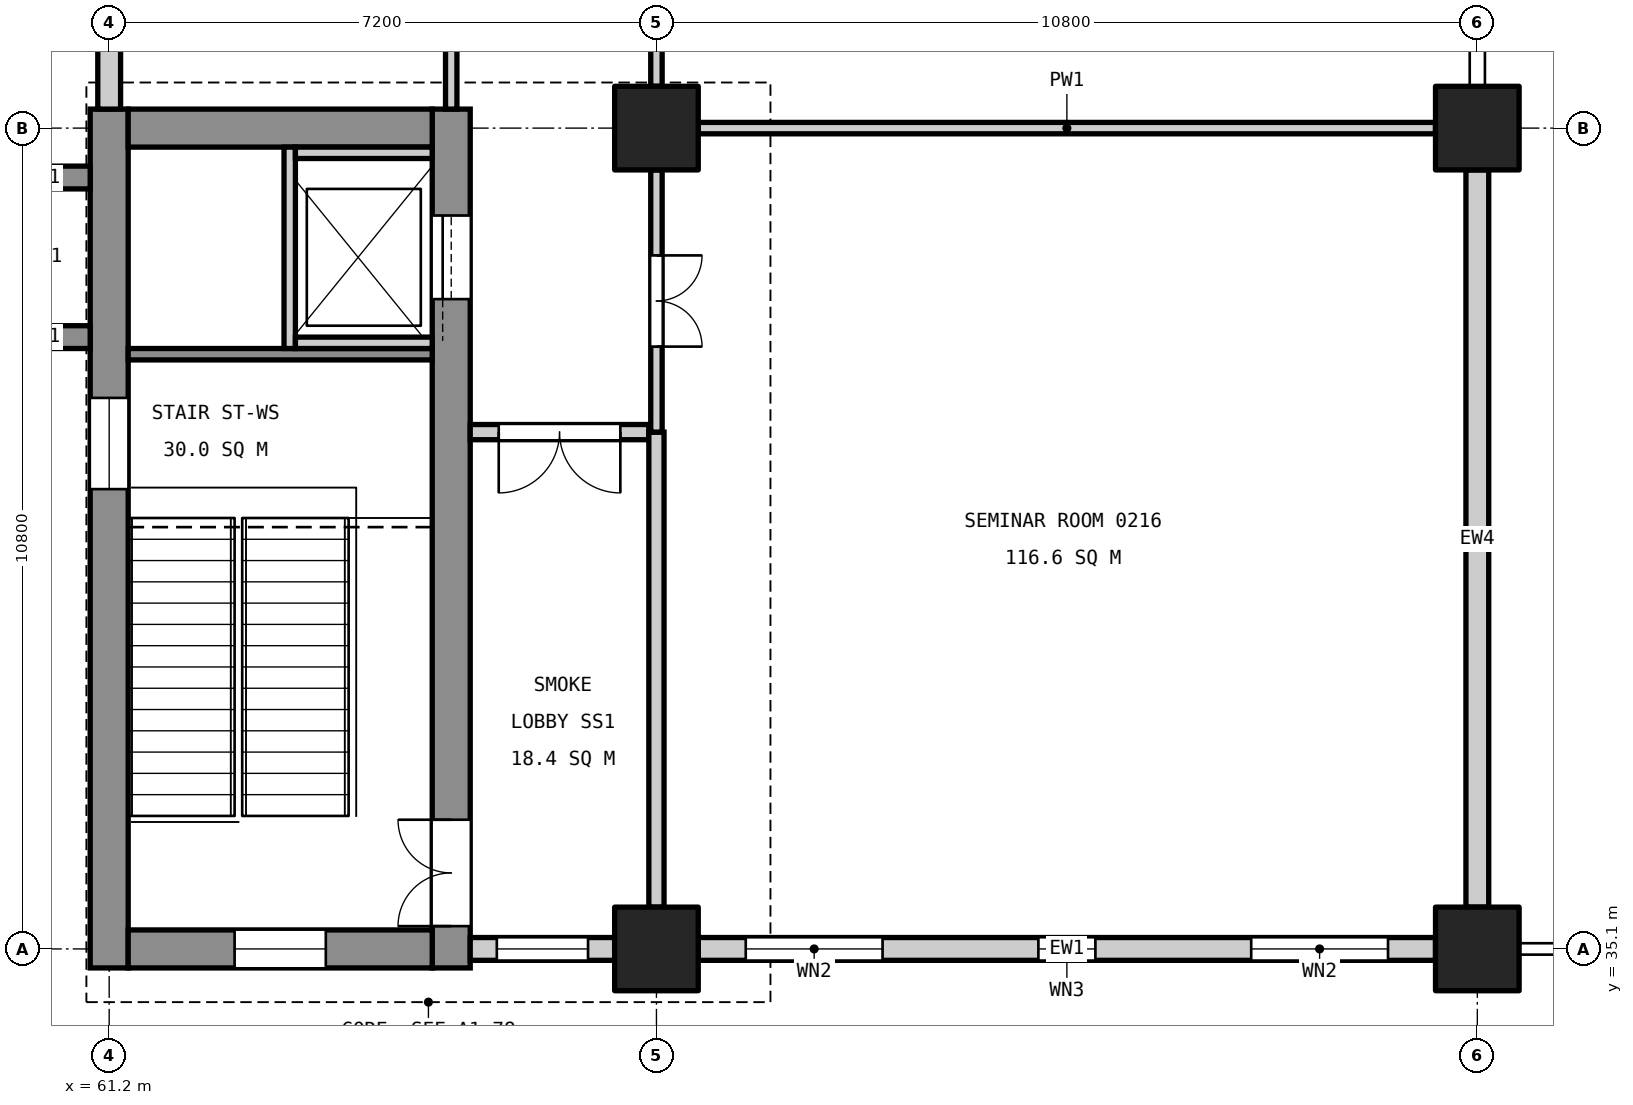
"""IFC4 building model, lengths in metres.
Left out: names, types, materials, properties, quantities, classifications, styles, units other than length and angle.
Written with IfcOpenShell. Run it as: python <this file> out.ifc"""

import sys

from ifc_helpers import new_model, si_unit, direction, frame, frame_2d, origin, origin_2d, place, context, subcontext, project, spatial, rectangle, extrude, element, fill, save


model = new_model("IFC4")
c1 = context("Model", 3, precision=1e-05, world=origin(), true_north=direction((0.0, 1.0)))
c2 = subcontext(c1, "Body", "Model", "MODEL_VIEW")
j1 = project(units=[si_unit("LENGTHUNIT", "METRE"), si_unit("PLANEANGLEUNIT", "RADIAN")], contexts=[c1])
p1 = place(None, origin())
s1 = spatial("IfcSite", under=j1, at=p1, CompositionType="ELEMENT")
p2 = place(p1, origin())
s2 = spatial("IfcBuilding", under=s1, at=p2, CompositionType="ELEMENT")
p3 = place(p2, frame((0.0, 0.0, 11.4)))
s3 = spatial("IfcBuildingStorey", under=s2, at=p3, CompositionType="ELEMENT", Elevation=11.4)
for number, where, z_axis, x_axis in (
    (1, (68.4, 35.1, 0.0), (0.0, 0.0, 1.0), (1.0, 0.0, 0.0)),
    (2, (68.4, 45.9, 0.0), (0.0, 0.0, 1.0), (1.0, 0.0, 0.0)),
    (3, (79.2, 35.1, 0.0), (0.0, 0.0, 1.0), (1.0, 0.0, 0.0)),
    (4, (79.2, 45.9, 0.0), (0.0, 0.0, 1.0), (1.0, 0.0, 0.0)),
):
    element("IfcColumn", number, at=place(p3, frame(where, z_axis=z_axis, x_axis=x_axis)), inside=s3, PredefinedType="COLUMN", context=c2, shape_type="SweptSolid", body=[
        extrude(rectangle(XDim=1.1, YDim=1.1, at=origin_2d()), origin(), (0.0, 0.0, 1.0), 5.4),
    ])
p4 = place(p3, frame((61.2, 34.85, 0.0), z_axis=(0.0, 0.0, 1.0), x_axis=(0.0, 1.0, 0.0)))
e5 = element("IfcWall", 5, at=p4, inside=s3, PredefinedType="SHEAR", context=c2, shape_type="SweptSolid", body=[
    extrude(rectangle(XDim=11.3, YDim=0.5, at=frame_2d((5.65, 0.0))), origin(), (0.0, 0.0, 1.0), 5.1),
])
p5 = place(p4, frame((6.3, 0.0, 3.4)))
e6 = element("IfcOpeningElement", 6, at=p5, cuts=e5, PredefinedType="OPENING", context=c2, shape_type="SweptSolid", body=[
    extrude(rectangle(XDim=1.2, YDim=0.9, at=frame_2d((0.6, 0.45))), frame((0.0, 0.26, 0.0), z_axis=(0.0, -1.0, 0.0), x_axis=(1.0, 0.0, 0.0)), (0.0, 0.0, 1.0), 0.52),
])
p6 = place(p3, frame((65.7, 34.85, 0.0), z_axis=(0.0, 0.0, 1.0), x_axis=(0.0, 1.0, 0.0)))
e7 = element("IfcWall", 7, at=p6, inside=s3, PredefinedType="SHEAR", context=c2, shape_type="SweptSolid", body=[
    extrude(rectangle(XDim=11.3, YDim=0.5, at=frame_2d((5.65, 0.0))), origin(), (0.0, 0.0, 1.0), 5.1),
])
p7 = place(p6, frame((0.55, 0.0, 0.0)))
e8 = element("IfcOpeningElement", 8, at=p7, cuts=e7, PredefinedType="OPENING", context=c2, shape_type="SweptSolid", body=[
    extrude(rectangle(XDim=1.4, YDim=2.1, at=frame_2d((0.7, 1.05))), frame((0.0, 0.26, 0.0), z_axis=(0.0, -1.0, 0.0), x_axis=(1.0, 0.0, 0.0)), (0.0, 0.0, 1.0), 0.52),
])
p8 = place(p6, frame((8.8, 0.0, 0.0)))
e9 = element("IfcOpeningElement", 9, at=p8, cuts=e7, PredefinedType="OPENING", context=c2, shape_type="SweptSolid", body=[
    extrude(rectangle(XDim=1.1, YDim=2.1, at=frame_2d((0.55, 1.05))), frame((0.0, 0.26, 0.0), z_axis=(0.0, -1.0, 0.0), x_axis=(1.0, 0.0, 0.0)), (0.0, 0.0, 1.0), 0.52),
])
p9 = place(p3, frame((61.45, 35.1, 0.0), z_axis=(0.0, 0.0, 1.0), x_axis=(1.0, 0.0, 0.0)))
e10 = element("IfcWall", 10, at=p9, inside=s3, PredefinedType="SHEAR", context=c2, shape_type="SweptSolid", body=[
    extrude(rectangle(XDim=4.0, YDim=0.5, at=frame_2d((2.0, 0.0))), origin(), (0.0, 0.0, 1.0), 5.1),
])
p10 = place(p9, frame((1.4, 0.0, 3.4)))
e11 = element("IfcOpeningElement", 11, at=p10, cuts=e10, PredefinedType="OPENING", context=c2, shape_type="SweptSolid", body=[
    extrude(rectangle(XDim=1.2, YDim=0.9, at=frame_2d((0.6, 0.45))), frame((0.0, 0.26, 0.0), z_axis=(0.0, -1.0, 0.0), x_axis=(1.0, 0.0, 0.0)), (0.0, 0.0, 1.0), 0.52),
])
p11 = place(p3, frame((61.45, 45.9, 0.0), z_axis=(0.0, 0.0, 1.0), x_axis=(1.0, 0.0, 0.0)))
e12 = element("IfcWall", 12, at=p11, inside=s3, PredefinedType="SHEAR", context=c2, shape_type="SweptSolid", body=[
    extrude(rectangle(XDim=4.0, YDim=0.5, at=frame_2d((2.0, 0.0))), origin(), (0.0, 0.0, 1.0), 5.1),
])
for number, where, z_axis, x_axis in (
    (13, (60.95, 43.15, 0.0), (0.0, 0.0, 1.0), (-1.0, 0.0, 0.0)),
    (14, (60.95, 45.25, 0.0), (0.0, 0.0, 1.0), (-1.0, 0.0, 0.0)),
):
    element("IfcWall", number, at=place(p3, frame(where, z_axis=z_axis, x_axis=x_axis)), inside=s3, PredefinedType="SHEAR", context=c2, shape_type="SweptSolid", body=[
        extrude(rectangle(XDim=1.25, YDim=0.3, at=frame_2d((0.625, 0.0))), origin(), (0.0, 0.0, 1.0), 5.4),
    ])
p12 = place(p3, frame((61.45, 42.925, 0.0), z_axis=(0.0, 0.0, 1.0), x_axis=(1.0, 0.0, 0.0)))
e15 = element("IfcWall", 15, at=p12, inside=s3, PredefinedType="SOLIDWALL", context=c2, shape_type="SweptSolid", body=[
    extrude(rectangle(XDim=4.0, YDim=0.15, at=frame_2d((2.0, 0.0))), origin(), (0.0, 0.0, 1.0), 5.1),
])
p13 = place(p3, frame((63.575, 43.0, 0.0), z_axis=(0.0, 0.0, 1.0), x_axis=(0.0, 1.0, 0.0)))
e16 = element("IfcWall", 16, at=p13, inside=s3, PredefinedType="SOLIDWALL", context=c2, shape_type="SweptSolid", body=[
    extrude(rectangle(XDim=2.65, YDim=0.15, at=frame_2d((1.325, 0.0))), origin(), (0.0, 0.0, 1.0), 5.4),
])
for number, where, z_axis, x_axis in (
    (17, (63.65, 43.075, 0.0), (0.0, 0.0, 1.0), (1.0, 0.0, 0.0)),
    (18, (63.65, 45.575, 0.0), (0.0, 0.0, 1.0), (1.0, 0.0, 0.0)),
):
    element("IfcWall", number, at=place(p3, frame(where, z_axis=z_axis, x_axis=x_axis)), inside=s3, PredefinedType="SOLIDWALL", context=c2, shape_type="SweptSolid", body=[
        extrude(rectangle(XDim=1.8, YDim=0.15, at=frame_2d((0.9, 0.0))), origin(), (0.0, 0.0, 1.0), 5.4),
    ])
p14 = place(p3, frame((61.2, 46.15, 0.0), z_axis=(0.0, 0.0, 1.0), x_axis=(0.0, 1.0, 0.0)))
e19 = element("IfcWall", 19, at=p14, inside=s3, PredefinedType="STANDARD", context=c2, shape_type="SweptSolid", body=[
    extrude(rectangle(XDim=10.0, YDim=0.3, at=frame_2d((5.0, 0.0))), origin(), (0.0, 0.0, 1.0), 4.1),
])
p15 = place(p14, frame((1.3, 0.0, 0.8)))
e20 = element("IfcOpeningElement", 20, at=p15, cuts=e19, PredefinedType="OPENING", context=c2, shape_type="SweptSolid", body=[
    extrude(rectangle(XDim=0.75, YDim=1.2, at=frame_2d((0.375, 0.6))), frame((0.0, 0.16, 0.0), z_axis=(0.0, -1.0, 0.0), x_axis=(1.0, 0.0, 0.0)), (0.0, 0.0, 1.0), 0.32),
])
p16 = place(p14, frame((4.25, 0.0, 0.9)))
e21 = element("IfcOpeningElement", 21, at=p16, cuts=e19, PredefinedType="OPENING", context=c2, shape_type="SweptSolid", body=[
    extrude(rectangle(XDim=1.8, YDim=3.0, at=frame_2d((0.9, 1.5))), frame((0.0, 0.16, 0.0), z_axis=(0.0, -1.0, 0.0), x_axis=(1.0, 0.0, 0.0)), (0.0, 0.0, 1.0), 0.32),
])
p17 = place(p14, frame((7.575, 0.0, 0.9)))
e22 = element("IfcOpeningElement", 22, at=p17, cuts=e19, PredefinedType="OPENING", context=c2, shape_type="SweptSolid", body=[
    extrude(rectangle(XDim=1.8, YDim=3.0, at=frame_2d((0.9, 1.5))), frame((0.0, 0.16, 0.0), z_axis=(0.0, -1.0, 0.0), x_axis=(1.0, 0.0, 0.0)), (0.0, 0.0, 1.0), 0.32),
])
p18 = place(p3, frame((65.95, 35.1, 0.0), z_axis=(0.0, 0.0, 1.0), x_axis=(1.0, 0.0, 0.0)))
e23 = element("IfcWall", 23, at=p18, inside=s3, PredefinedType="STANDARD", context=c2, shape_type="SweptSolid", body=[
    extrude(rectangle(XDim=1.9, YDim=0.3, at=frame_2d((0.95, 0.0))), origin(), (0.0, 0.0, 1.0), 4.3),
])
p19 = place(p18, frame((0.35, 0.0, 0.9)))
e24 = element("IfcOpeningElement", 24, at=p19, cuts=e23, PredefinedType="OPENING", context=c2, shape_type="SweptSolid", body=[
    extrude(rectangle(XDim=1.2, YDim=2.4, at=frame_2d((0.6, 1.2))), frame((0.0, 0.16, 0.0), z_axis=(0.0, -1.0, 0.0), x_axis=(1.0, 0.0, 0.0)), (0.0, 0.0, 1.0), 0.32),
])
p20 = place(p3, frame((68.95, 35.1, 0.0), z_axis=(0.0, 0.0, 1.0), x_axis=(1.0, 0.0, 0.0)))
e25 = element("IfcWall", 25, at=p20, inside=s3, PredefinedType="STANDARD", context=c2, shape_type="SweptSolid", body=[
    extrude(rectangle(XDim=9.7, YDim=0.3, at=frame_2d((4.85, 0.0))), origin(), (0.0, 0.0, 1.0), 4.3),
])
p21 = place(p20, frame((0.625, 0.0, 0.9)))
e26 = element("IfcOpeningElement", 26, at=p21, cuts=e25, PredefinedType="OPENING", context=c2, shape_type="SweptSolid", body=[
    extrude(rectangle(XDim=1.8, YDim=3.0, at=frame_2d((0.9, 1.5))), frame((0.0, 0.16, 0.0), z_axis=(0.0, -1.0, 0.0), x_axis=(1.0, 0.0, 0.0)), (0.0, 0.0, 1.0), 0.32),
])
p22 = place(p20, frame((4.475, 0.0, 0.8)))
e27 = element("IfcOpeningElement", 27, at=p22, cuts=e25, PredefinedType="OPENING", context=c2, shape_type="SweptSolid", body=[
    extrude(rectangle(XDim=0.75, YDim=1.2, at=frame_2d((0.375, 0.6))), frame((0.0, 0.16, 0.0), z_axis=(0.0, -1.0, 0.0), x_axis=(1.0, 0.0, 0.0)), (0.0, 0.0, 1.0), 0.32),
])
p23 = place(p20, frame((7.275, 0.0, 0.9)))
e28 = element("IfcOpeningElement", 28, at=p23, cuts=e25, PredefinedType="OPENING", context=c2, shape_type="SweptSolid", body=[
    extrude(rectangle(XDim=1.8, YDim=3.0, at=frame_2d((0.9, 1.5))), frame((0.0, 0.16, 0.0), z_axis=(0.0, -1.0, 0.0), x_axis=(1.0, 0.0, 0.0)), (0.0, 0.0, 1.0), 0.32),
])
p24 = place(p3, frame((79.2, 35.65, 0.0), z_axis=(0.0, 0.0, 1.0), x_axis=(0.0, 1.0, 0.0)))
e29 = element("IfcWall", 29, at=p24, inside=s3, PredefinedType="STANDARD", context=c2, shape_type="SweptSolid", body=[
    extrude(rectangle(XDim=9.7, YDim=0.3, at=frame_2d((4.85, 0.0))), origin(), (0.0, 0.0, 1.0), 4.0),
])
p25 = place(p3, frame((65.7, 46.15, 0.0), z_axis=(0.0, 0.0, 1.0), x_axis=(0.0, 1.0, 0.0)))
e30 = element("IfcWall", 30, at=p25, inside=s3, PredefinedType="PARTITIONING", context=c2, shape_type="SweptSolid", body=[
    extrude(rectangle(XDim=10.4, YDim=0.15, at=frame_2d((5.2, 0.0))), origin(), (0.0, 0.0, 1.0), 4.0),
])
p26 = place(p25, frame((4.65, 0.0, 0.0)))
e31 = element("IfcOpeningElement", 31, at=p26, cuts=e30, PredefinedType="OPENING", context=c2, shape_type="SweptSolid", body=[
    extrude(rectangle(XDim=1.0, YDim=2.1, at=frame_2d((0.5, 1.05))), frame((0.0, 0.085, 0.0), z_axis=(0.0, -1.0, 0.0), x_axis=(1.0, 0.0, 0.0)), (0.0, 0.0, 1.0), 0.17),
])
p27 = place(p25, frame((8.25, 0.0, 0.0)))
e32 = element("IfcOpeningElement", 32, at=p27, cuts=e30, PredefinedType="OPENING", context=c2, shape_type="SweptSolid", body=[
    extrude(rectangle(XDim=1.0, YDim=2.1, at=frame_2d((0.5, 1.05))), frame((0.0, 0.085, 0.0), z_axis=(0.0, -1.0, 0.0), x_axis=(1.0, 0.0, 0.0)), (0.0, 0.0, 1.0), 0.17),
])
p28 = place(p25, frame((1.05, 0.0, 0.0)))
e33 = element("IfcOpeningElement", 33, at=p28, cuts=e30, PredefinedType="OPENING", context=c2, shape_type="SweptSolid", body=[
    extrude(rectangle(XDim=1.0, YDim=2.1, at=frame_2d((0.5, 1.05))), frame((0.0, 0.085, 0.0), z_axis=(0.0, -1.0, 0.0), x_axis=(1.0, 0.0, 0.0)), (0.0, 0.0, 1.0), 0.17),
])
p29 = place(p3, frame((65.95, 41.9, 0.0), z_axis=(0.0, 0.0, 1.0), x_axis=(1.0, 0.0, 0.0)))
e34 = element("IfcWall", 34, at=p29, inside=s3, PredefinedType="PARTITIONING", context=c2, shape_type="SweptSolid", body=[
    extrude(rectangle(XDim=2.35, YDim=0.2, at=frame_2d((1.175, 0.0))), origin(), (0.0, 0.0, 1.0), 4.0),
])
p30 = place(p29, frame((0.375, 0.0, 0.0)))
e35 = element("IfcOpeningElement", 35, at=p30, cuts=e34, PredefinedType="OPENING", context=c2, shape_type="SweptSolid", body=[
    extrude(rectangle(XDim=1.6, YDim=2.1, at=frame_2d((0.8, 1.05))), frame((0.0, 0.11, 0.0), z_axis=(0.0, -1.0, 0.0), x_axis=(1.0, 0.0, 0.0)), (0.0, 0.0, 1.0), 0.22),
])
p31 = place(p3, frame((68.4, 35.65, 0.0), z_axis=(0.0, 0.0, 1.0), x_axis=(0.0, 1.0, 0.0)))
e36 = element("IfcWall", 36, at=p31, inside=s3, PredefinedType="PARTITIONING", context=c2, shape_type="SweptSolid", body=[
    extrude(rectangle(XDim=6.25, YDim=0.2, at=frame_2d((3.125, 0.0))), origin(), (0.0, 0.0, 1.0), 4.0),
])
p32 = place(p3, frame((68.4, 41.9, 0.0), z_axis=(0.0, 0.0, 1.0), x_axis=(0.0, 1.0, 0.0)))
e37 = element("IfcWall", 37, at=p32, inside=s3, PredefinedType="PARTITIONING", context=c2, shape_type="SweptSolid", body=[
    extrude(rectangle(XDim=3.45, YDim=0.15, at=frame_2d((1.725, 0.0))), origin(), (0.0, 0.0, 1.0), 4.0),
])
p33 = place(p32, frame((1.125, 0.0, 0.0)))
e38 = element("IfcOpeningElement", 38, at=p33, cuts=e37, PredefinedType="OPENING", context=c2, shape_type="SweptSolid", body=[
    extrude(rectangle(XDim=1.2, YDim=2.1, at=frame_2d((0.6, 1.05))), frame((0.0, 0.085, 0.0), z_axis=(0.0, -1.0, 0.0), x_axis=(1.0, 0.0, 0.0)), (0.0, 0.0, 1.0), 0.17),
])
p34 = place(p3, frame((68.4, 46.45, 0.0), z_axis=(0.0, 0.0, 1.0), x_axis=(0.0, 1.0, 0.0)))
e39 = element("IfcWall", 39, at=p34, inside=s3, PredefinedType="PARTITIONING", context=c2, shape_type="SweptSolid", body=[
    extrude(rectangle(XDim=9.7, YDim=0.15, at=frame_2d((4.85, 0.0))), origin(), (0.0, 0.0, 1.0), 4.0),
])
p35 = place(p34, frame((4.25, 0.0, 0.0)))
e40 = element("IfcOpeningElement", 40, at=p35, cuts=e39, PredefinedType="OPENING", context=c2, shape_type="SweptSolid", body=[
    extrude(rectangle(XDim=1.2, YDim=2.1, at=frame_2d((0.6, 1.05))), frame((0.0, 0.085, 0.0), z_axis=(0.0, -1.0, 0.0), x_axis=(1.0, 0.0, 0.0)), (0.0, 0.0, 1.0), 0.17),
])
p36 = place(p34, frame((0.925, 0.0, 0.0)))
e41 = element("IfcOpeningElement", 41, at=p36, cuts=e39, PredefinedType="OPENING", context=c2, shape_type="SweptSolid", body=[
    extrude(rectangle(XDim=1.2, YDim=2.1, at=frame_2d((0.6, 1.05))), frame((0.0, 0.085, 0.0), z_axis=(0.0, -1.0, 0.0), x_axis=(1.0, 0.0, 0.0)), (0.0, 0.0, 1.0), 0.17),
])
p37 = place(p34, frame((7.575, 0.0, 0.0)))
e42 = element("IfcOpeningElement", 42, at=p37, cuts=e39, PredefinedType="OPENING", context=c2, shape_type="SweptSolid", body=[
    extrude(rectangle(XDim=1.2, YDim=2.1, at=frame_2d((0.6, 1.05))), frame((0.0, 0.085, 0.0), z_axis=(0.0, -1.0, 0.0), x_axis=(1.0, 0.0, 0.0)), (0.0, 0.0, 1.0), 0.17),
])
p38 = place(p3, frame((68.95, 45.9, 0.0), z_axis=(0.0, 0.0, 1.0), x_axis=(1.0, 0.0, 0.0)))
e43 = element("IfcWall", 43, at=p38, inside=s3, PredefinedType="PARTITIONING", context=c2, shape_type="SweptSolid", body=[
    extrude(rectangle(XDim=9.7, YDim=0.15, at=frame_2d((4.85, 0.0))), origin(), (0.0, 0.0, 1.0), 4.3),
])
p39 = place(p7, origin())
e44 = element("IfcDoor", 44, at=p39, inside=s3, OperationType="DOUBLE_DOOR_SINGLE_SWING", PredefinedType="DOOR", context=c2, shape_type="SweptSolid", body=[
    extrude(rectangle(XDim=1.4, YDim=2.1, at=frame_2d((0.7, 1.05))), frame((0.0, 0.025, 0.0), z_axis=(0.0, -1.0, 0.0), x_axis=(1.0, 0.0, 0.0)), (0.0, 0.0, 1.0), 0.05),
])
fill(e8, e44)
p40 = place(p8, origin())
e45 = element("IfcDoor", 45, at=p40, inside=s3, OperationType="SLIDING_TO_LEFT", PredefinedType="DOOR", context=c2, shape_type="SweptSolid", body=[
    extrude(rectangle(XDim=1.1, YDim=2.1, at=frame_2d((0.55, 1.05))), frame((0.0, 0.025, 0.0), z_axis=(0.0, -1.0, 0.0), x_axis=(1.0, 0.0, 0.0)), (0.0, 0.0, 1.0), 0.05),
])
fill(e9, e45)
p41 = place(p19, origin())
e46 = element("IfcWindow", 46, at=p41, inside=s3, PartitioningType="SINGLE_PANEL", PredefinedType="WINDOW", context=c2, shape_type="SweptSolid", body=[
    extrude(rectangle(XDim=1.2, YDim=2.4, at=frame_2d((0.6, 1.2))), frame((0.0, 0.03, 0.0), z_axis=(0.0, -1.0, 0.0), x_axis=(1.0, 0.0, 0.0)), (0.0, 0.0, 1.0), 0.06),
])
fill(e24, e46)
p42 = place(p21, origin())
e47 = element("IfcWindow", 47, at=p42, inside=s3, PartitioningType="SINGLE_PANEL", PredefinedType="WINDOW", context=c2, shape_type="SweptSolid", body=[
    extrude(rectangle(XDim=1.8, YDim=3.0, at=frame_2d((0.9, 1.5))), frame((0.0, 0.03, 0.0), z_axis=(0.0, -1.0, 0.0), x_axis=(1.0, 0.0, 0.0)), (0.0, 0.0, 1.0), 0.06),
])
fill(e26, e47)
p43 = place(p22, origin())
e48 = element("IfcWindow", 48, at=p43, inside=s3, PartitioningType="SINGLE_PANEL", PredefinedType="WINDOW", context=c2, shape_type="SweptSolid", body=[
    extrude(rectangle(XDim=0.75, YDim=1.2, at=frame_2d((0.375, 0.6))), frame((0.0, 0.03, 0.0), z_axis=(0.0, -1.0, 0.0), x_axis=(1.0, 0.0, 0.0)), (0.0, 0.0, 1.0), 0.06),
])
fill(e27, e48)
p44 = place(p23, origin())
e49 = element("IfcWindow", 49, at=p44, inside=s3, PartitioningType="SINGLE_PANEL", PredefinedType="WINDOW", context=c2, shape_type="SweptSolid", body=[
    extrude(rectangle(XDim=1.8, YDim=3.0, at=frame_2d((0.9, 1.5))), frame((0.0, 0.03, 0.0), z_axis=(0.0, -1.0, 0.0), x_axis=(1.0, 0.0, 0.0)), (0.0, 0.0, 1.0), 0.06),
])
fill(e28, e49)
p45 = place(p5, origin())
e50 = element("IfcWindow", 50, at=p45, inside=s3, PartitioningType="SINGLE_PANEL", PredefinedType="WINDOW", context=c2, shape_type="SweptSolid", body=[
    extrude(rectangle(XDim=1.2, YDim=0.9, at=frame_2d((0.6, 0.45))), frame((0.0, 0.03, 0.0), z_axis=(0.0, -1.0, 0.0), x_axis=(1.0, 0.0, 0.0)), (0.0, 0.0, 1.0), 0.06),
])
fill(e6, e50)
p46 = place(p10, origin())
e51 = element("IfcWindow", 51, at=p46, inside=s3, PartitioningType="SINGLE_PANEL", PredefinedType="WINDOW", context=c2, shape_type="SweptSolid", body=[
    extrude(rectangle(XDim=1.2, YDim=0.9, at=frame_2d((0.6, 0.45))), frame((0.0, 0.03, 0.0), z_axis=(0.0, -1.0, 0.0), x_axis=(1.0, 0.0, 0.0)), (0.0, 0.0, 1.0), 0.06),
])
fill(e11, e51)
p47 = place(p33, frame((1.2, 0.0, 0.0), z_axis=(0.0, 0.0, 1.0), x_axis=(-1.0, 0.0, 0.0)))
e52 = element("IfcDoor", 52, at=p47, inside=s3, OperationType="DOUBLE_DOOR_SINGLE_SWING", PredefinedType="DOOR", context=c2, shape_type="SweptSolid", body=[
    extrude(rectangle(XDim=1.2, YDim=2.1, at=frame_2d((0.6, 1.05))), frame((0.0, 0.025, 0.0), z_axis=(0.0, -1.0, 0.0), x_axis=(1.0, 0.0, 0.0)), (0.0, 0.0, 1.0), 0.05),
])
fill(e38, e52)
p48 = place(p30, frame((1.6, 0.0, 0.0), z_axis=(0.0, 0.0, 1.0), x_axis=(-1.0, 0.0, 0.0)))
e53 = element("IfcDoor", 53, at=p48, inside=s3, OperationType="DOUBLE_DOOR_SINGLE_SWING", PredefinedType="DOOR", context=c2, shape_type="SweptSolid", body=[
    extrude(rectangle(XDim=1.6, YDim=2.1, at=frame_2d((0.8, 1.05))), frame((0.0, 0.025, 0.0), z_axis=(0.0, -1.0, 0.0), x_axis=(1.0, 0.0, 0.0)), (0.0, 0.0, 1.0), 0.05),
])
fill(e35, e53)
save(model, sys.argv[1])
